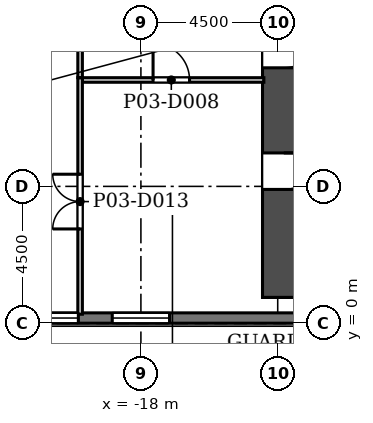
"""IFC4 building model, lengths in metres.
Left out: names, types, materials, properties, quantities, classifications, styles, units other than length and angle.
Written with IfcOpenShell. Run it as: python <this file> out.ifc"""

import sys

from ifc_helpers import new_model, si_unit, direction, frame, frame_2d, origin, place, context, subcontext, project, spatial, rectangle, extrude, element, fill, save


model = new_model("IFC4")
c1 = context("Model", 3, precision=1e-05, world=origin(), true_north=direction((0.0, 1.0)))
c2 = subcontext(c1, "Body", "Model", "MODEL_VIEW")
j1 = project(units=[si_unit("LENGTHUNIT", "METRE"), si_unit("PLANEANGLEUNIT", "RADIAN")], contexts=[c1])
p1 = place(None, origin())
s1 = spatial("IfcSite", under=j1, at=p1, CompositionType="ELEMENT")
p2 = place(p1, origin())
s2 = spatial("IfcBuilding", under=s1, at=p2, CompositionType="ELEMENT")
p3 = place(p2, frame((0.0, 0.0, 20.0)))
s3 = spatial("IfcBuildingStorey", under=s2, at=p3, CompositionType="ELEMENT", Elevation=20.0)
p4 = place(p3, frame((-14.0, 1.55, 0.0), z_axis=(0.0, 0.0, 1.0), x_axis=(1.0, 0.0, 0.0)))
e1 = element("IfcWall", 1, at=p4, inside=s3, PredefinedType="SHEAR", context=c2, shape_type="SweptSolid", body=[
    extrude(rectangle(XDim=28.0, YDim=1.4, at=frame_2d((14.0, 0.0))), origin(), (0.0, 0.0, 1.0), 5.0),
])
p5 = place(p3, frame((-13.3, 11.052, 0.0), z_axis=(0.0, 0.0, 1.0), x_axis=(0.0, -1.0, 0.0)))
e2 = element("IfcWall", 2, at=p5, inside=s3, PredefinedType="SHEAR", context=c2, shape_type="SweptSolid", body=[
    extrude(rectangle(XDim=10.202, YDim=1.4, at=frame_2d((5.101, 0.0))), origin(), (0.0, 0.0, 1.0), 5.0),
])
p6 = place(p5, frame((5.453, 0.0, 0.0)))
e3 = element("IfcOpeningElement", 3, at=p6, cuts=e2, PredefinedType="OPENING", context=c2, shape_type="SweptSolid", body=[
    extrude(rectangle(XDim=1.2, YDim=2.1, at=frame_2d((0.6, 1.05))), frame((0.0, 0.71, 0.0), z_axis=(0.0, -1.0, 0.0), x_axis=(1.0, 0.0, 0.0)), (0.0, 0.0, 1.0), 1.42),
])
p7 = place(p5, frame((1.453, 0.0, 0.0)))
e4 = element("IfcOpeningElement", 4, at=p7, cuts=e2, PredefinedType="OPENING", context=c2, shape_type="SweptSolid", body=[
    extrude(rectangle(XDim=1.2, YDim=2.1, at=frame_2d((0.6, 1.05))), frame((0.0, 0.71, 0.0), z_axis=(0.0, -1.0, 0.0), x_axis=(1.0, 0.0, 0.0)), (0.0, 0.0, 1.0), 1.42),
])
p8 = place(p3, frame((-38.0, 0.17, 0.0), z_axis=(0.0, 0.0, 1.0), x_axis=(1.0, 0.0, 0.0)))
e5 = element("IfcWall", 5, at=p8, inside=s3, PredefinedType="SOLIDWALL", context=c2, shape_type="SweptSolid", body=[
    extrude(rectangle(XDim=76.0, YDim=0.34, at=frame_2d((38.0, 0.0))), origin(), (0.0, 0.0, 1.0), 3.0),
])
p9 = place(p8, frame((1.058, 0.0, 0.9)))
e6 = element("IfcOpeningElement", 6, at=p9, cuts=e5, PredefinedType="OPENING", context=c2, shape_type="SweptSolid", body=[
    extrude(rectangle(XDim=1.885, YDim=1.9, at=frame_2d((0.942, 0.95))), frame((0.0, 0.18, 0.0), z_axis=(0.0, -1.0, 0.0), x_axis=(1.0, 0.0, 0.0)), (0.0, 0.0, 1.0), 0.36),
])
p10 = place(p8, frame((4.058, 0.0, 0.9)))
e7 = element("IfcOpeningElement", 7, at=p10, cuts=e5, PredefinedType="OPENING", context=c2, shape_type="SweptSolid", body=[
    extrude(rectangle(XDim=1.885, YDim=1.9, at=frame_2d((0.942, 0.95))), frame((0.0, 0.18, 0.0), z_axis=(0.0, -1.0, 0.0), x_axis=(1.0, 0.0, 0.0)), (0.0, 0.0, 1.0), 0.36),
])
p11 = place(p8, frame((7.058, 0.0, 0.9)))
e8 = element("IfcOpeningElement", 8, at=p11, cuts=e5, PredefinedType="OPENING", context=c2, shape_type="SweptSolid", body=[
    extrude(rectangle(XDim=1.885, YDim=1.9, at=frame_2d((0.942, 0.95))), frame((0.0, 0.18, 0.0), z_axis=(0.0, -1.0, 0.0), x_axis=(1.0, 0.0, 0.0)), (0.0, 0.0, 1.0), 0.36),
])
p12 = place(p8, frame((10.058, 0.0, 0.9)))
e9 = element("IfcOpeningElement", 9, at=p12, cuts=e5, PredefinedType="OPENING", context=c2, shape_type="SweptSolid", body=[
    extrude(rectangle(XDim=1.885, YDim=1.9, at=frame_2d((0.942, 0.95))), frame((0.0, 0.18, 0.0), z_axis=(0.0, -1.0, 0.0), x_axis=(1.0, 0.0, 0.0)), (0.0, 0.0, 1.0), 0.36),
])
p13 = place(p8, frame((13.058, 0.0, 0.9)))
e10 = element("IfcOpeningElement", 10, at=p13, cuts=e5, PredefinedType="OPENING", context=c2, shape_type="SweptSolid", body=[
    extrude(rectangle(XDim=1.885, YDim=1.9, at=frame_2d((0.942, 0.95))), frame((0.0, 0.18, 0.0), z_axis=(0.0, -1.0, 0.0), x_axis=(1.0, 0.0, 0.0)), (0.0, 0.0, 1.0), 0.36),
])
p14 = place(p8, frame((16.058, 0.0, 0.9)))
e11 = element("IfcOpeningElement", 11, at=p14, cuts=e5, PredefinedType="OPENING", context=c2, shape_type="SweptSolid", body=[
    extrude(rectangle(XDim=1.885, YDim=1.9, at=frame_2d((0.942, 0.95))), frame((0.0, 0.18, 0.0), z_axis=(0.0, -1.0, 0.0), x_axis=(1.0, 0.0, 0.0)), (0.0, 0.0, 1.0), 0.36),
])
p15 = place(p8, frame((19.058, 0.0, 0.9)))
e12 = element("IfcOpeningElement", 12, at=p15, cuts=e5, PredefinedType="OPENING", context=c2, shape_type="SweptSolid", body=[
    extrude(rectangle(XDim=1.885, YDim=1.9, at=frame_2d((0.942, 0.95))), frame((0.0, 0.18, 0.0), z_axis=(0.0, -1.0, 0.0), x_axis=(1.0, 0.0, 0.0)), (0.0, 0.0, 1.0), 0.36),
])
p16 = place(p8, frame((55.058, 0.0, 0.9)))
e13 = element("IfcOpeningElement", 13, at=p16, cuts=e5, PredefinedType="OPENING", context=c2, shape_type="SweptSolid", body=[
    extrude(rectangle(XDim=1.885, YDim=1.9, at=frame_2d((0.942, 0.95))), frame((0.0, 0.18, 0.0), z_axis=(0.0, -1.0, 0.0), x_axis=(1.0, 0.0, 0.0)), (0.0, 0.0, 1.0), 0.36),
])
p17 = place(p8, frame((58.058, 0.0, 0.9)))
e14 = element("IfcOpeningElement", 14, at=p17, cuts=e5, PredefinedType="OPENING", context=c2, shape_type="SweptSolid", body=[
    extrude(rectangle(XDim=1.885, YDim=1.9, at=frame_2d((0.942, 0.95))), frame((0.0, 0.18, 0.0), z_axis=(0.0, -1.0, 0.0), x_axis=(1.0, 0.0, 0.0)), (0.0, 0.0, 1.0), 0.36),
])
p18 = place(p8, frame((61.058, 0.0, 0.9)))
e15 = element("IfcOpeningElement", 15, at=p18, cuts=e5, PredefinedType="OPENING", context=c2, shape_type="SweptSolid", body=[
    extrude(rectangle(XDim=1.885, YDim=1.9, at=frame_2d((0.942, 0.95))), frame((0.0, 0.18, 0.0), z_axis=(0.0, -1.0, 0.0), x_axis=(1.0, 0.0, 0.0)), (0.0, 0.0, 1.0), 0.36),
])
p19 = place(p8, frame((64.058, 0.0, 0.9)))
e16 = element("IfcOpeningElement", 16, at=p19, cuts=e5, PredefinedType="OPENING", context=c2, shape_type="SweptSolid", body=[
    extrude(rectangle(XDim=1.885, YDim=1.9, at=frame_2d((0.942, 0.95))), frame((0.0, 0.18, 0.0), z_axis=(0.0, -1.0, 0.0), x_axis=(1.0, 0.0, 0.0)), (0.0, 0.0, 1.0), 0.36),
])
p20 = place(p8, frame((67.058, 0.0, 0.9)))
e17 = element("IfcOpeningElement", 17, at=p20, cuts=e5, PredefinedType="OPENING", context=c2, shape_type="SweptSolid", body=[
    extrude(rectangle(XDim=1.885, YDim=1.9, at=frame_2d((0.942, 0.95))), frame((0.0, 0.18, 0.0), z_axis=(0.0, -1.0, 0.0), x_axis=(1.0, 0.0, 0.0)), (0.0, 0.0, 1.0), 0.36),
])
p21 = place(p8, frame((70.058, 0.0, 0.9)))
e18 = element("IfcOpeningElement", 18, at=p21, cuts=e5, PredefinedType="OPENING", context=c2, shape_type="SweptSolid", body=[
    extrude(rectangle(XDim=1.885, YDim=1.9, at=frame_2d((0.942, 0.95))), frame((0.0, 0.18, 0.0), z_axis=(0.0, -1.0, 0.0), x_axis=(1.0, 0.0, 0.0)), (0.0, 0.0, 1.0), 0.36),
])
p22 = place(p8, frame((73.058, 0.0, 0.9)))
e19 = element("IfcOpeningElement", 19, at=p22, cuts=e5, PredefinedType="OPENING", context=c2, shape_type="SweptSolid", body=[
    extrude(rectangle(XDim=1.885, YDim=1.9, at=frame_2d((0.942, 0.95))), frame((0.0, 0.18, 0.0), z_axis=(0.0, -1.0, 0.0), x_axis=(1.0, 0.0, 0.0)), (0.0, 0.0, 1.0), 0.36),
])
p23 = place(p3, frame((-4.853, 74.393, 0.0), z_axis=(0.0, 0.0, 1.0), x_axis=(-0.49999894854, -0.866026010844, 0.0)))
e20 = element("IfcWall", 20, at=p23, inside=s3, PredefinedType="SOLIDWALL", context=c2, shape_type="SweptSolid", body=[
    extrude(rectangle(XDim=76.0, YDim=0.34, at=frame_2d((38.0, 0.0))), origin(), (0.0, 0.0, 1.0), 3.0),
])
p24 = place(p23, frame((1.058, 0.0, 0.9)))
e21 = element("IfcOpeningElement", 21, at=p24, cuts=e20, PredefinedType="OPENING", context=c2, shape_type="SweptSolid", body=[
    extrude(rectangle(XDim=1.885, YDim=1.9, at=frame_2d((0.942, 0.95))), frame((0.0, 0.18, 0.0), z_axis=(0.0, -1.0, 0.0), x_axis=(1.0, 0.0, 0.0)), (0.0, 0.0, 1.0), 0.36),
])
p25 = place(p23, frame((4.058, 0.0, 0.9)))
e22 = element("IfcOpeningElement", 22, at=p25, cuts=e20, PredefinedType="OPENING", context=c2, shape_type="SweptSolid", body=[
    extrude(rectangle(XDim=1.885, YDim=1.9, at=frame_2d((0.942, 0.95))), frame((0.0, 0.18, 0.0), z_axis=(0.0, -1.0, 0.0), x_axis=(1.0, 0.0, 0.0)), (0.0, 0.0, 1.0), 0.36),
])
p26 = place(p23, frame((7.058, 0.0, 0.9)))
e23 = element("IfcOpeningElement", 23, at=p26, cuts=e20, PredefinedType="OPENING", context=c2, shape_type="SweptSolid", body=[
    extrude(rectangle(XDim=1.885, YDim=1.9, at=frame_2d((0.942, 0.95))), frame((0.0, 0.18, 0.0), z_axis=(0.0, -1.0, 0.0), x_axis=(1.0, 0.0, 0.0)), (0.0, 0.0, 1.0), 0.36),
])
p27 = place(p23, frame((10.058, 0.0, 0.9)))
e24 = element("IfcOpeningElement", 24, at=p27, cuts=e20, PredefinedType="OPENING", context=c2, shape_type="SweptSolid", body=[
    extrude(rectangle(XDim=1.885, YDim=1.9, at=frame_2d((0.942, 0.95))), frame((0.0, 0.18, 0.0), z_axis=(0.0, -1.0, 0.0), x_axis=(1.0, 0.0, 0.0)), (0.0, 0.0, 1.0), 0.36),
])
p28 = place(p23, frame((13.058, 0.0, 0.9)))
e25 = element("IfcOpeningElement", 25, at=p28, cuts=e20, PredefinedType="OPENING", context=c2, shape_type="SweptSolid", body=[
    extrude(rectangle(XDim=1.885, YDim=1.9, at=frame_2d((0.942, 0.95))), frame((0.0, 0.18, 0.0), z_axis=(0.0, -1.0, 0.0), x_axis=(1.0, 0.0, 0.0)), (0.0, 0.0, 1.0), 0.36),
])
p29 = place(p23, frame((16.058, 0.0, 0.9)))
e26 = element("IfcOpeningElement", 26, at=p29, cuts=e20, PredefinedType="OPENING", context=c2, shape_type="SweptSolid", body=[
    extrude(rectangle(XDim=1.885, YDim=1.9, at=frame_2d((0.942, 0.95))), frame((0.0, 0.18, 0.0), z_axis=(0.0, -1.0, 0.0), x_axis=(1.0, 0.0, 0.0)), (0.0, 0.0, 1.0), 0.36),
])
p30 = place(p23, frame((19.058, 0.0, 0.9)))
e27 = element("IfcOpeningElement", 27, at=p30, cuts=e20, PredefinedType="OPENING", context=c2, shape_type="SweptSolid", body=[
    extrude(rectangle(XDim=1.885, YDim=1.9, at=frame_2d((0.942, 0.95))), frame((0.0, 0.18, 0.0), z_axis=(0.0, -1.0, 0.0), x_axis=(1.0, 0.0, 0.0)), (0.0, 0.0, 1.0), 0.36),
])
p31 = place(p23, frame((22.058, 0.0, 0.9)))
e28 = element("IfcOpeningElement", 28, at=p31, cuts=e20, PredefinedType="OPENING", context=c2, shape_type="SweptSolid", body=[
    extrude(rectangle(XDim=1.885, YDim=1.9, at=frame_2d((0.942, 0.95))), frame((0.0, 0.18, 0.0), z_axis=(0.0, -1.0, 0.0), x_axis=(1.0, 0.0, 0.0)), (0.0, 0.0, 1.0), 0.36),
])
p32 = place(p23, frame((25.058, 0.0, 0.9)))
e29 = element("IfcOpeningElement", 29, at=p32, cuts=e20, PredefinedType="OPENING", context=c2, shape_type="SweptSolid", body=[
    extrude(rectangle(XDim=1.885, YDim=1.9, at=frame_2d((0.942, 0.95))), frame((0.0, 0.18, 0.0), z_axis=(0.0, -1.0, 0.0), x_axis=(1.0, 0.0, 0.0)), (0.0, 0.0, 1.0), 0.36),
])
p33 = place(p23, frame((28.058, 0.0, 0.9)))
e30 = element("IfcOpeningElement", 30, at=p33, cuts=e20, PredefinedType="OPENING", context=c2, shape_type="SweptSolid", body=[
    extrude(rectangle(XDim=1.885, YDim=1.9, at=frame_2d((0.942, 0.95))), frame((0.0, 0.18, 0.0), z_axis=(0.0, -1.0, 0.0), x_axis=(1.0, 0.0, 0.0)), (0.0, 0.0, 1.0), 0.36),
])
p34 = place(p23, frame((31.058, 0.0, 0.9)))
e31 = element("IfcOpeningElement", 31, at=p34, cuts=e20, PredefinedType="OPENING", context=c2, shape_type="SweptSolid", body=[
    extrude(rectangle(XDim=1.885, YDim=1.9, at=frame_2d((0.942, 0.95))), frame((0.0, 0.18, 0.0), z_axis=(0.0, -1.0, 0.0), x_axis=(1.0, 0.0, 0.0)), (0.0, 0.0, 1.0), 0.36),
])
p35 = place(p23, frame((34.058, 0.0, 0.9)))
e32 = element("IfcOpeningElement", 32, at=p35, cuts=e20, PredefinedType="OPENING", context=c2, shape_type="SweptSolid", body=[
    extrude(rectangle(XDim=1.885, YDim=1.9, at=frame_2d((0.942, 0.95))), frame((0.0, 0.18, 0.0), z_axis=(0.0, -1.0, 0.0), x_axis=(1.0, 0.0, 0.0)), (0.0, 0.0, 1.0), 0.36),
])
p36 = place(p23, frame((37.058, 0.0, 0.9)))
e33 = element("IfcOpeningElement", 33, at=p36, cuts=e20, PredefinedType="OPENING", context=c2, shape_type="SweptSolid", body=[
    extrude(rectangle(XDim=1.885, YDim=1.9, at=frame_2d((0.942, 0.95))), frame((0.0, 0.18, 0.0), z_axis=(0.0, -1.0, 0.0), x_axis=(1.0, 0.0, 0.0)), (0.0, 0.0, 1.0), 0.36),
])
p37 = place(p23, frame((40.058, 0.0, 0.9)))
e34 = element("IfcOpeningElement", 34, at=p37, cuts=e20, PredefinedType="OPENING", context=c2, shape_type="SweptSolid", body=[
    extrude(rectangle(XDim=1.885, YDim=1.9, at=frame_2d((0.942, 0.95))), frame((0.0, 0.18, 0.0), z_axis=(0.0, -1.0, 0.0), x_axis=(1.0, 0.0, 0.0)), (0.0, 0.0, 1.0), 0.36),
])
p38 = place(p23, frame((43.058, 0.0, 0.9)))
e35 = element("IfcOpeningElement", 35, at=p38, cuts=e20, PredefinedType="OPENING", context=c2, shape_type="SweptSolid", body=[
    extrude(rectangle(XDim=1.885, YDim=1.9, at=frame_2d((0.942, 0.95))), frame((0.0, 0.18, 0.0), z_axis=(0.0, -1.0, 0.0), x_axis=(1.0, 0.0, 0.0)), (0.0, 0.0, 1.0), 0.36),
])
p39 = place(p23, frame((46.058, 0.0, 0.9)))
e36 = element("IfcOpeningElement", 36, at=p39, cuts=e20, PredefinedType="OPENING", context=c2, shape_type="SweptSolid", body=[
    extrude(rectangle(XDim=1.885, YDim=1.9, at=frame_2d((0.942, 0.95))), frame((0.0, 0.18, 0.0), z_axis=(0.0, -1.0, 0.0), x_axis=(1.0, 0.0, 0.0)), (0.0, 0.0, 1.0), 0.36),
])
p40 = place(p23, frame((49.058, 0.0, 0.9)))
e37 = element("IfcOpeningElement", 37, at=p40, cuts=e20, PredefinedType="OPENING", context=c2, shape_type="SweptSolid", body=[
    extrude(rectangle(XDim=1.885, YDim=1.9, at=frame_2d((0.942, 0.95))), frame((0.0, 0.18, 0.0), z_axis=(0.0, -1.0, 0.0), x_axis=(1.0, 0.0, 0.0)), (0.0, 0.0, 1.0), 0.36),
])
p41 = place(p23, frame((52.058, 0.0, 0.9)))
e38 = element("IfcOpeningElement", 38, at=p41, cuts=e20, PredefinedType="OPENING", context=c2, shape_type="SweptSolid", body=[
    extrude(rectangle(XDim=1.885, YDim=1.9, at=frame_2d((0.942, 0.95))), frame((0.0, 0.18, 0.0), z_axis=(0.0, -1.0, 0.0), x_axis=(1.0, 0.0, 0.0)), (0.0, 0.0, 1.0), 0.36),
])
p42 = place(p23, frame((55.058, 0.0, 0.9)))
e39 = element("IfcOpeningElement", 39, at=p42, cuts=e20, PredefinedType="OPENING", context=c2, shape_type="SweptSolid", body=[
    extrude(rectangle(XDim=1.885, YDim=1.9, at=frame_2d((0.942, 0.95))), frame((0.0, 0.18, 0.0), z_axis=(0.0, -1.0, 0.0), x_axis=(1.0, 0.0, 0.0)), (0.0, 0.0, 1.0), 0.36),
])
p43 = place(p23, frame((58.058, 0.0, 0.9)))
e40 = element("IfcOpeningElement", 40, at=p43, cuts=e20, PredefinedType="OPENING", context=c2, shape_type="SweptSolid", body=[
    extrude(rectangle(XDim=1.885, YDim=1.9, at=frame_2d((0.942, 0.95))), frame((0.0, 0.18, 0.0), z_axis=(0.0, -1.0, 0.0), x_axis=(1.0, 0.0, 0.0)), (0.0, 0.0, 1.0), 0.36),
])
p44 = place(p23, frame((61.058, 0.0, 0.9)))
e41 = element("IfcOpeningElement", 41, at=p44, cuts=e20, PredefinedType="OPENING", context=c2, shape_type="SweptSolid", body=[
    extrude(rectangle(XDim=1.885, YDim=1.9, at=frame_2d((0.942, 0.95))), frame((0.0, 0.18, 0.0), z_axis=(0.0, -1.0, 0.0), x_axis=(1.0, 0.0, 0.0)), (0.0, 0.0, 1.0), 0.36),
])
p45 = place(p23, frame((64.058, 0.0, 0.9)))
e42 = element("IfcOpeningElement", 42, at=p45, cuts=e20, PredefinedType="OPENING", context=c2, shape_type="SweptSolid", body=[
    extrude(rectangle(XDim=1.885, YDim=1.9, at=frame_2d((0.942, 0.95))), frame((0.0, 0.18, 0.0), z_axis=(0.0, -1.0, 0.0), x_axis=(1.0, 0.0, 0.0)), (0.0, 0.0, 1.0), 0.36),
])
p46 = place(p23, frame((67.058, 0.0, 0.9)))
e43 = element("IfcOpeningElement", 43, at=p46, cuts=e20, PredefinedType="OPENING", context=c2, shape_type="SweptSolid", body=[
    extrude(rectangle(XDim=1.885, YDim=1.9, at=frame_2d((0.942, 0.95))), frame((0.0, 0.18, 0.0), z_axis=(0.0, -1.0, 0.0), x_axis=(1.0, 0.0, 0.0)), (0.0, 0.0, 1.0), 0.36),
])
p47 = place(p23, frame((70.058, 0.0, 0.9)))
e44 = element("IfcOpeningElement", 44, at=p47, cuts=e20, PredefinedType="OPENING", context=c2, shape_type="SweptSolid", body=[
    extrude(rectangle(XDim=1.885, YDim=1.9, at=frame_2d((0.942, 0.95))), frame((0.0, 0.18, 0.0), z_axis=(0.0, -1.0, 0.0), x_axis=(1.0, 0.0, 0.0)), (0.0, 0.0, 1.0), 0.36),
])
p48 = place(p23, frame((73.058, 0.0, 0.9)))
e45 = element("IfcOpeningElement", 45, at=p48, cuts=e20, PredefinedType="OPENING", context=c2, shape_type="SweptSolid", body=[
    extrude(rectangle(XDim=1.885, YDim=1.9, at=frame_2d((0.942, 0.95))), frame((0.0, 0.18, 0.0), z_axis=(0.0, -1.0, 0.0), x_axis=(1.0, 0.0, 0.0)), (0.0, 0.0, 1.0), 0.36),
])
p49 = place(p3, frame((-19.925, 8.0, 0.0), z_axis=(0.0, 0.0, 1.0), x_axis=(1.0, 0.0, 0.0)))
e46 = element("IfcWall", 46, at=p49, inside=s3, PredefinedType="PARTITIONING", context=c2, shape_type="SweptSolid", body=[
    extrude(rectangle(XDim=5.97, YDim=0.15, at=frame_2d((2.985, 0.0))), origin(), (0.0, 0.0, 1.0), 3.0),
])
p50 = place(p49, frame((2.325, 0.0, 0.0)))
e47 = element("IfcOpeningElement", 47, at=p50, cuts=e46, PredefinedType="OPENING", context=c2, shape_type="SweptSolid", body=[
    extrude(rectangle(XDim=1.2, YDim=2.1, at=frame_2d((0.6, 1.05))), frame((0.0, 0.085, 0.0), z_axis=(0.0, -1.0, 0.0), x_axis=(1.0, 0.0, 0.0)), (0.0, 0.0, 1.0), 0.17),
])
p51 = place(p3, frame((-20.0, 8.075, 0.0), z_axis=(0.0, 0.0, 1.0), x_axis=(0.0, -1.0, 0.0)))
e48 = element("IfcWall", 48, at=p51, inside=s3, PredefinedType="PARTITIONING", context=c2, shape_type="SweptSolid", body=[
    extrude(rectangle(XDim=7.78, YDim=0.15, at=frame_2d((3.89, 0.0))), origin(), (0.0, 0.0, 1.0), 3.0),
])
p52 = place(p51, frame((3.175, 0.0, 0.0)))
e49 = element("IfcOpeningElement", 49, at=p52, cuts=e48, PredefinedType="OPENING", context=c2, shape_type="SweptSolid", body=[
    extrude(rectangle(XDim=1.8, YDim=2.1, at=frame_2d((0.9, 1.05))), frame((0.0, 0.085, 0.0), z_axis=(0.0, -1.0, 0.0), x_axis=(1.0, 0.0, 0.0)), (0.0, 0.0, 1.0), 0.17),
])
p53 = place(p3, frame((-20.0, 9.925, 0.0), z_axis=(0.0, 0.0, 1.0), x_axis=(0.0, -1.0, 0.0)))
e50 = element("IfcWall", 50, at=p53, inside=s3, PredefinedType="PARTITIONING", context=c2, shape_type="SweptSolid", body=[
    extrude(rectangle(XDim=1.85, YDim=0.15, at=frame_2d((0.925, 0.0))), origin(), (0.0, 0.0, 1.0), 3.0),
])
p54 = place(p14, origin())
e51 = element("IfcWindow", 51, at=p54, inside=s3, PartitioningType="SINGLE_PANEL", PredefinedType="WINDOW", context=c2, shape_type="SweptSolid", body=[
    extrude(rectangle(XDim=1.885, YDim=1.9, at=frame_2d((0.942, 0.95))), frame((0.0, 0.11, 0.0), z_axis=(0.0, -1.0, 0.0), x_axis=(1.0, 0.0, 0.0)), (0.0, 0.0, 1.0), 0.06),
])
fill(e11, e51)
p55 = place(p15, origin())
e52 = element("IfcWindow", 52, at=p55, inside=s3, PartitioningType="SINGLE_PANEL", PredefinedType="WINDOW", context=c2, shape_type="SweptSolid", body=[
    extrude(rectangle(XDim=1.885, YDim=1.9, at=frame_2d((0.942, 0.95))), frame((0.0, 0.11, 0.0), z_axis=(0.0, -1.0, 0.0), x_axis=(1.0, 0.0, 0.0)), (0.0, 0.0, 1.0), 0.06),
])
fill(e12, e52)
p56 = place(p6, origin())
e53 = element("IfcDoor", 53, at=p56, inside=s3, OperationType="SINGLE_SWING_LEFT", PredefinedType="DOOR", context=c2, shape_type="SweptSolid", body=[
    extrude(rectangle(XDim=1.2, YDim=2.1, at=frame_2d((0.6, 1.05))), frame((0.0, 0.025, 0.0), z_axis=(0.0, -1.0, 0.0), x_axis=(1.0, 0.0, 0.0)), (0.0, 0.0, 1.0), 0.05),
])
fill(e3, e53)
p57 = place(p7, origin())
e54 = element("IfcDoor", 54, at=p57, inside=s3, OperationType="SINGLE_SWING_LEFT", PredefinedType="DOOR", context=c2, shape_type="SweptSolid", body=[
    extrude(rectangle(XDim=1.2, YDim=2.1, at=frame_2d((0.6, 1.05))), frame((0.0, 0.025, 0.0), z_axis=(0.0, -1.0, 0.0), x_axis=(1.0, 0.0, 0.0)), (0.0, 0.0, 1.0), 0.05),
])
fill(e4, e54)
p58 = place(p50, origin())
e55 = element("IfcDoor", 55, at=p58, inside=s3, OperationType="SINGLE_SWING_LEFT", PredefinedType="DOOR", context=c2, shape_type="SweptSolid", body=[
    extrude(rectangle(XDim=1.2, YDim=2.1, at=frame_2d((0.6, 1.05))), frame((0.0, 0.025, 0.0), z_axis=(0.0, -1.0, 0.0), x_axis=(1.0, 0.0, 0.0)), (0.0, 0.0, 1.0), 0.05),
])
fill(e47, e55)
p59 = place(p52, frame((1.8, 0.0, 0.0), z_axis=(0.0, 0.0, 1.0), x_axis=(-1.0, 0.0, 0.0)))
e56 = element("IfcDoor", 56, at=p59, inside=s3, OperationType="DOUBLE_DOOR_SINGLE_SWING", PredefinedType="DOOR", context=c2, shape_type="SweptSolid", body=[
    extrude(rectangle(XDim=1.8, YDim=2.1, at=frame_2d((0.9, 1.05))), frame((0.0, 0.025, 0.0), z_axis=(0.0, -1.0, 0.0), x_axis=(1.0, 0.0, 0.0)), (0.0, 0.0, 1.0), 0.05),
])
fill(e49, e56)
save(model, sys.argv[1])
